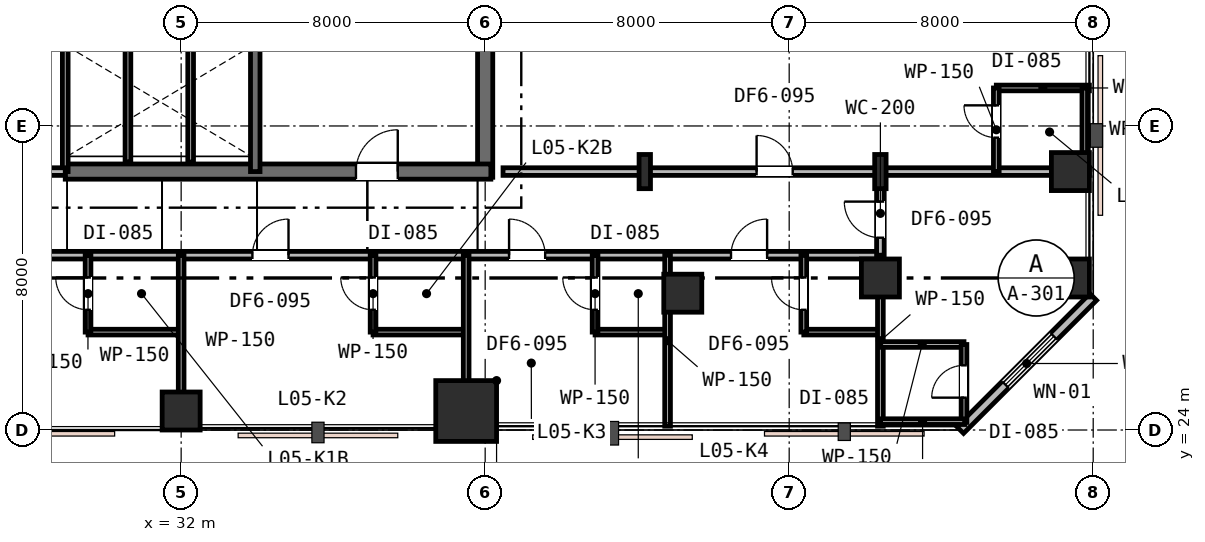
"""IFC4 building model, lengths in metres.
Left out: names, types, materials, properties, quantities, classifications, styles, units other than length and angle.
Written with IfcOpenShell. Run it as: python <this file> out.ifc"""

import sys

from ifc_helpers import new_model, si_unit, direction, frame, frame_2d, origin, origin_2d, place, context, subcontext, project, spatial, rectangle, i_section, extrude, element, fill, save


model = new_model("IFC4")
c1 = context("Model", 3, precision=1e-05, world=origin(), true_north=direction((0.0, 1.0)))
c2 = subcontext(c1, "Body", "Model", "MODEL_VIEW")
j1 = project(units=[si_unit("LENGTHUNIT", "METRE"), si_unit("PLANEANGLEUNIT", "RADIAN")], contexts=[c1])
p1 = place(None, origin())
s1 = spatial("IfcSite", under=j1, at=p1, CompositionType="ELEMENT")
p2 = place(p1, origin())
s2 = spatial("IfcBuilding", under=s1, at=p2, CompositionType="ELEMENT")
p3 = place(p2, frame((0.0, 0.0, 25.8)))
s3 = spatial("IfcBuildingStorey", under=s2, at=p3, CompositionType="ELEMENT", Elevation=25.8)
p4 = place(p3, frame((40.0, 30.65, 0.0), z_axis=(0.0, 0.0, 1.0), x_axis=(0.0, 1.0, 0.0)))
e1 = element("IfcWall", 1, at=p4, inside=s3, PredefinedType="SHEAR", context=c2, shape_type="SweptSolid", body=[
    extrude(rectangle(XDim=12.3, YDim=0.4, at=frame_2d((6.15, 0.0))), origin(), (0.0, 0.0, 1.0), 3.6),
])
p5 = place(p3, frame((28.95, 30.8, 0.0), z_axis=(0.0, 0.0, 1.0), x_axis=(1.0, 0.0, 0.0)))
e2 = element("IfcWall", 2, at=p5, inside=s3, PredefinedType="SHEAR", context=c2, shape_type="SweptSolid", body=[
    extrude(rectangle(XDim=11.2, YDim=0.4, at=frame_2d((5.6, 0.0))), origin(), (0.0, 0.0, 1.0), 3.6),
])
p6 = place(p5, frame((7.65, 0.0, 0.0)))
e3 = element("IfcOpeningElement", 3, at=p6, cuts=e2, PredefinedType="OPENING", context=c2, shape_type="SweptSolid", body=[
    extrude(rectangle(XDim=1.1, YDim=2.15, at=frame_2d((0.55, 1.075))), frame((0.0, 0.21, 0.0), z_axis=(0.0, -1.0, 0.0), x_axis=(1.0, 0.0, 0.0)), (0.0, 0.0, 1.0), 0.42),
])
p7 = place(p3, frame((33.95, 30.8, 0.0), z_axis=(0.0, 0.0, 1.0), x_axis=(0.0, 1.0, 0.0)))
e4 = element("IfcWall", 4, at=p7, inside=s3, PredefinedType="SHEAR", context=c2, shape_type="SweptSolid", body=[
    extrude(rectangle(XDim=6.45, YDim=0.25, at=frame_2d((3.225, 0.0))), origin(), (0.0, 0.0, 1.0), 3.6),
])
p8 = place(p3, frame((32.0, 24.5, 0.0), z_axis=(0.0, 0.0, 1.0), x_axis=(1.0, 0.0, 0.0)))
e5 = element("IfcColumn", 5, at=p8, inside=s3, PredefinedType="COLUMN", context=c2, shape_type="SweptSolid", body=[
    extrude(rectangle(XDim=1.0, YDim=1.0, at=origin_2d()), origin(), (0.0, 0.0, 1.0), 3.6),
])
p9 = place(p3, frame((39.5, 24.5, 0.0), z_axis=(0.0, 0.0, 1.0), x_axis=(1.0, 0.0, 0.0)))
e6 = element("IfcColumn", 6, at=p9, inside=s3, PredefinedType="COLUMN", context=c2, shape_type="SweptSolid", body=[
    extrude(rectangle(XDim=1.6, YDim=1.6, at=origin_2d()), origin(), (0.0, 0.0, 1.0), 3.6),
])
for number, where, z_axis, x_axis in (
    (7, (45.2, 27.6, 0.0), (0.0, 0.0, 1.0), (1.0, 0.0, 0.0)),
    (8, (50.4, 28.0, 0.0), (0.0, 0.0, 1.0), (1.0, 0.0, 0.0)),
    (9, (55.4, 28.0, 0.0), (0.0, 0.0, 1.0), (1.0, 0.0, 0.0)),
    (10, (55.4, 30.8, 0.0), (0.0, 0.0, 1.0), (1.0, 0.0, 0.0)),
):
    element("IfcColumn", number, at=place(p3, frame(where, z_axis=z_axis, x_axis=x_axis)), inside=s3, PredefinedType="COLUMN", context=c2, shape_type="SweptSolid", body=[
        extrude(rectangle(XDim=1.0, YDim=1.0, at=origin_2d()), origin(), (0.0, 0.0, 1.0), 3.6),
    ])
for number, where, z_axis, x_axis in (
    (11, (44.2, 30.8, 0.0), (0.0, 0.0, 1.0), (1.0, 0.0, 0.0)),
    (12, (50.4, 30.8, 0.0), (0.0, 0.0, 1.0), (1.0, 0.0, 0.0)),
):
    element("IfcColumn", number, at=place(p3, frame(where, z_axis=z_axis, x_axis=x_axis)), inside=s3, PredefinedType="COLUMN", context=c2, shape_type="SweptSolid", body=[
        extrude(i_section(OverallWidth=0.3, OverallDepth=0.9, WebThickness=0.018, FlangeThickness=0.035, FilletRadius=0.03, at=origin_2d()), origin(), (0.0, 0.0, 1.0), 3.6),
    ])
p10 = place(p3, frame((52.5, 24.0, 0.0), z_axis=(0.0, 0.0, 1.0), x_axis=(0.707106781187, 0.707106781187, 0.0)))
e13 = element("IfcWall", 13, at=p10, inside=s3, PredefinedType="STANDARD", context=c2, shape_type="SweptSolid", body=[
    extrude(rectangle(XDim=4.95, YDim=0.25, at=frame_2d((2.475, 0.0))), origin(), (0.0, 0.0, 1.0), 3.33),
])
p11 = place(p10, frame((1.685, 0.0, 0.75)))
e14 = element("IfcOpeningElement", 14, at=p11, cuts=e13, PredefinedType="OPENING", context=c2, shape_type="SweptSolid", body=[
    extrude(rectangle(XDim=1.8, YDim=1.85, at=frame_2d((0.9, 0.925))), frame((0.0, 0.135, 0.0), z_axis=(0.0, -1.0, 0.0), x_axis=(1.0, 0.0, 0.0)), (0.0, 0.0, 1.0), 0.27),
])
p12 = place(p3, frame((28.95, 30.8, 0.0), z_axis=(0.0, 0.0, 1.0), x_axis=(0.0, 1.0, 0.0)))
e15 = element("IfcWall", 15, at=p12, inside=s3, PredefinedType="PLUMBINGWALL", context=c2, shape_type="SweptSolid", body=[
    extrude(rectangle(XDim=3.45, YDim=0.15, at=frame_2d((1.725, 0.0))), origin(), (0.0, 0.0, 1.0), 3.33),
])
p13 = place(p3, frame((27.05, 30.8, 0.0), z_axis=(0.0, 0.0, 1.0), x_axis=(1.0, 0.0, 0.0)))
e16 = element("IfcWall", 16, at=p13, inside=s3, PredefinedType="PARTITIONING", context=c2, shape_type="SweptSolid", body=[
    extrude(rectangle(XDim=1.9, YDim=0.2, at=frame_2d((0.95, 0.0))), origin(), (0.0, 0.0, 1.0), 3.33),
])
p14 = place(p13, frame((0.4, 0.0, 0.0)))
e17 = element("IfcOpeningElement", 17, at=p14, cuts=e16, PredefinedType="OPENING", context=c2, shape_type="SweptSolid", body=[
    extrude(rectangle(XDim=1.1, YDim=2.15, at=frame_2d((0.55, 1.075))), frame((0.0, 0.11, 0.0), z_axis=(0.0, -1.0, 0.0), x_axis=(1.0, 0.0, 0.0)), (0.0, 0.0, 1.0), 0.22),
])
for number, where, z_axis, x_axis in (
    (18, (30.6, 31.05, 0.0), (0.0, 0.0, 1.0), (0.0, 1.0, 0.0)),
    (19, (32.25, 31.05, 0.0), (0.0, 0.0, 1.0), (0.0, 1.0, 0.0)),
):
    element("IfcWall", number, at=place(p3, frame(where, z_axis=z_axis, x_axis=x_axis)), inside=s3, PredefinedType="PLUMBINGWALL", context=c2, shape_type="SweptSolid", body=[
        extrude(rectangle(XDim=3.1, YDim=0.15, at=frame_2d((1.55, 0.0))), origin(), (0.0, 0.0, 1.0), 3.33),
    ])
p15 = place(p3, frame((13.8, 28.6, 0.0), z_axis=(0.0, 0.0, 1.0), x_axis=(1.0, 0.0, 0.0)))
e20 = element("IfcWall", 20, at=p15, inside=s3, PredefinedType="PARTITIONING", context=c2, shape_type="SweptSolid", body=[
    extrude(rectangle(XDim=36.6, YDim=0.2, at=frame_2d((18.3, 0.0))), origin(), (0.0, 0.0, 1.0), 2.68),
])
p16 = place(p15, frame((12.3, 0.0, 0.0)))
e21 = element("IfcOpeningElement", 21, at=p16, cuts=e20, PredefinedType="OPENING", context=c2, shape_type="SweptSolid", body=[
    extrude(rectangle(XDim=0.95, YDim=2.15, at=frame_2d((0.475, 1.075))), frame((0.0, 0.11, 0.0), z_axis=(0.0, -1.0, 0.0), x_axis=(1.0, 0.0, 0.0)), (0.0, 0.0, 1.0), 0.22),
])
p17 = place(p15, frame((20.075, 0.0, 0.0)))
e22 = element("IfcOpeningElement", 22, at=p17, cuts=e20, PredefinedType="OPENING", context=c2, shape_type="SweptSolid", body=[
    extrude(rectangle(XDim=0.95, YDim=2.15, at=frame_2d((0.475, 1.075))), frame((0.0, 0.11, 0.0), z_axis=(0.0, -1.0, 0.0), x_axis=(1.0, 0.0, 0.0)), (0.0, 0.0, 1.0), 0.22),
])
p18 = place(p15, frame((26.829, 0.0, 0.0)))
e23 = element("IfcOpeningElement", 23, at=p18, cuts=e20, PredefinedType="OPENING", context=c2, shape_type="SweptSolid", body=[
    extrude(rectangle(XDim=0.95, YDim=2.15, at=frame_2d((0.475, 1.075))), frame((0.0, 0.11, 0.0), z_axis=(0.0, -1.0, 0.0), x_axis=(1.0, 0.0, 0.0)), (0.0, 0.0, 1.0), 0.22),
])
p19 = place(p15, frame((32.669, 0.0, 0.0)))
e24 = element("IfcOpeningElement", 24, at=p19, cuts=e20, PredefinedType="OPENING", context=c2, shape_type="SweptSolid", body=[
    extrude(rectangle(XDim=0.95, YDim=2.15, at=frame_2d((0.475, 1.075))), frame((0.0, 0.11, 0.0), z_axis=(0.0, -1.0, 0.0), x_axis=(1.0, 0.0, 0.0)), (0.0, 0.0, 1.0), 0.22),
])
p20 = place(p3, frame((29.55, 26.576, 0.0), z_axis=(0.0, 0.0, 1.0), x_axis=(1.0, 0.0, 0.0)))
e25 = element("IfcWall", 25, at=p20, inside=s3, PredefinedType="PARTITIONING", context=c2, shape_type="SweptSolid", body=[
    extrude(rectangle(XDim=2.45, YDim=0.15, at=frame_2d((1.225, 0.0))), origin(), (0.0, 0.0, 1.0), 3.33),
])
p21 = place(p3, frame((29.55, 26.576, 0.0), z_axis=(0.0, 0.0, 1.0), x_axis=(0.0, 1.0, 0.0)))
e26 = element("IfcWall", 26, at=p21, inside=s3, PredefinedType="PARTITIONING", context=c2, shape_type="SweptSolid", body=[
    extrude(rectangle(XDim=2.024, YDim=0.15, at=frame_2d((1.012, 0.0))), origin(), (0.0, 0.0, 1.0), 3.33),
])
p22 = place(p21, frame((0.587, 0.0, 0.0)))
e27 = element("IfcOpeningElement", 27, at=p22, cuts=e26, PredefinedType="OPENING", context=c2, shape_type="SweptSolid", body=[
    extrude(rectangle(XDim=0.85, YDim=2.15, at=frame_2d((0.425, 1.075))), frame((0.0, 0.085, 0.0), z_axis=(0.0, -1.0, 0.0), x_axis=(1.0, 0.0, 0.0)), (0.0, 0.0, 1.0), 0.17),
])
p23 = place(p3, frame((32.0, 28.6, 0.0), z_axis=(0.0, 0.0, 1.0), x_axis=(0.0, -1.0, 0.0)))
e28 = element("IfcWall", 28, at=p23, inside=s3, PredefinedType="PARTITIONING", context=c2, shape_type="SweptSolid", body=[
    extrude(rectangle(XDim=4.5, YDim=0.15, at=frame_2d((2.25, 0.0))), origin(), (0.0, 0.0, 1.0), 2.87),
])
p24 = place(p3, frame((37.05, 26.576, 0.0), z_axis=(0.0, 0.0, 1.0), x_axis=(1.0, 0.0, 0.0)))
e29 = element("IfcWall", 29, at=p24, inside=s3, PredefinedType="PARTITIONING", context=c2, shape_type="SweptSolid", body=[
    extrude(rectangle(XDim=2.45, YDim=0.15, at=frame_2d((1.225, 0.0))), origin(), (0.0, 0.0, 1.0), 2.68),
])
p25 = place(p3, frame((37.05, 26.576, 0.0), z_axis=(0.0, 0.0, 1.0), x_axis=(0.0, 1.0, 0.0)))
e30 = element("IfcWall", 30, at=p25, inside=s3, PredefinedType="PARTITIONING", context=c2, shape_type="SweptSolid", body=[
    extrude(rectangle(XDim=2.024, YDim=0.15, at=frame_2d((1.012, 0.0))), origin(), (0.0, 0.0, 1.0), 2.92),
])
p26 = place(p25, frame((0.587, 0.0, 0.0)))
e31 = element("IfcOpeningElement", 31, at=p26, cuts=e30, PredefinedType="OPENING", context=c2, shape_type="SweptSolid", body=[
    extrude(rectangle(XDim=0.85, YDim=2.15, at=frame_2d((0.425, 1.075))), frame((0.0, 0.085, 0.0), z_axis=(0.0, -1.0, 0.0), x_axis=(1.0, 0.0, 0.0)), (0.0, 0.0, 1.0), 0.17),
])
p27 = place(p3, frame((39.5, 28.6, 0.0), z_axis=(0.0, 0.0, 1.0), x_axis=(0.0, -1.0, 0.0)))
e32 = element("IfcWall", 32, at=p27, inside=s3, PredefinedType="PARTITIONING", context=c2, shape_type="SweptSolid", body=[
    extrude(rectangle(XDim=4.5, YDim=0.15, at=frame_2d((2.25, 0.0))), origin(), (0.0, 0.0, 1.0), 2.68),
])
p28 = place(p3, frame((42.892, 26.576, 0.0), z_axis=(0.0, 0.0, 1.0), x_axis=(1.0, 0.0, 0.0)))
e33 = element("IfcWall", 33, at=p28, inside=s3, PredefinedType="PARTITIONING", context=c2, shape_type="SweptSolid", body=[
    extrude(rectangle(XDim=1.908, YDim=0.15, at=frame_2d((0.954, 0.0))), origin(), (0.0, 0.0, 1.0), 3.33),
])
p29 = place(p3, frame((42.892, 26.576, 0.0), z_axis=(0.0, 0.0, 1.0), x_axis=(0.0, 1.0, 0.0)))
e34 = element("IfcWall", 34, at=p29, inside=s3, PredefinedType="PARTITIONING", context=c2, shape_type="SweptSolid", body=[
    extrude(rectangle(XDim=2.024, YDim=0.15, at=frame_2d((1.012, 0.0))), origin(), (0.0, 0.0, 1.0), 3.33),
])
p30 = place(p29, frame((0.587, 0.0, 0.0)))
e35 = element("IfcOpeningElement", 35, at=p30, cuts=e34, PredefinedType="OPENING", context=c2, shape_type="SweptSolid", body=[
    extrude(rectangle(XDim=0.85, YDim=2.15, at=frame_2d((0.425, 1.075))), frame((0.0, 0.085, 0.0), z_axis=(0.0, -1.0, 0.0), x_axis=(1.0, 0.0, 0.0)), (0.0, 0.0, 1.0), 0.17),
])
p31 = place(p3, frame((44.8, 28.6, 0.0), z_axis=(0.0, 0.0, 1.0), x_axis=(0.0, -1.0, 0.0)))
e36 = element("IfcWall", 36, at=p31, inside=s3, PredefinedType="PARTITIONING", context=c2, shape_type="SweptSolid", body=[
    extrude(rectangle(XDim=4.5, YDim=0.15, at=frame_2d((2.25, 0.0))), origin(), (0.0, 0.0, 1.0), 2.68),
])
p32 = place(p3, frame((48.384, 26.576, 0.0), z_axis=(0.0, 0.0, 1.0), x_axis=(1.0, 0.0, 0.0)))
e37 = element("IfcWall", 37, at=p32, inside=s3, PredefinedType="PARTITIONING", context=c2, shape_type="SweptSolid", body=[
    extrude(rectangle(XDim=2.016, YDim=0.15, at=frame_2d((1.008, 0.0))), origin(), (0.0, 0.0, 1.0), 3.33),
])
p33 = place(p3, frame((48.384, 26.576, 0.0), z_axis=(0.0, 0.0, 1.0), x_axis=(0.0, 1.0, 0.0)))
e38 = element("IfcWall", 38, at=p33, inside=s3, PredefinedType="PARTITIONING", context=c2, shape_type="SweptSolid", body=[
    extrude(rectangle(XDim=2.024, YDim=0.15, at=frame_2d((1.012, 0.0))), origin(), (0.0, 0.0, 1.0), 3.33),
])
p34 = place(p33, frame((0.587, 0.0, 0.0)))
e39 = element("IfcOpeningElement", 39, at=p34, cuts=e38, PredefinedType="OPENING", context=c2, shape_type="SweptSolid", body=[
    extrude(rectangle(XDim=0.85, YDim=2.15, at=frame_2d((0.425, 1.075))), frame((0.0, 0.085, 0.0), z_axis=(0.0, -1.0, 0.0), x_axis=(1.0, 0.0, 0.0)), (0.0, 0.0, 1.0), 0.17),
])
p35 = place(p3, frame((50.4, 28.6, 0.0), z_axis=(0.0, 0.0, 1.0), x_axis=(0.0, -1.0, 0.0)))
e40 = element("IfcWall", 40, at=p35, inside=s3, PredefinedType="PARTITIONING", context=c2, shape_type="SweptSolid", body=[
    extrude(rectangle(XDim=4.5, YDim=0.15, at=frame_2d((2.25, 0.0))), origin(), (0.0, 0.0, 1.0), 2.68),
])
p36 = place(p3, frame((40.47, 30.8, 0.0), z_axis=(0.0, 0.0, 1.0), x_axis=(1.0, 0.0, 0.0)))
e41 = element("IfcWall", 41, at=p36, inside=s3, PredefinedType="PARTITIONING", context=c2, shape_type="SweptSolid", body=[
    extrude(rectangle(XDim=15.43, YDim=0.2, at=frame_2d((7.715, 0.0))), origin(), (0.0, 0.0, 1.0), 2.68),
])
p37 = place(p36, frame((6.673, 0.0, 0.0)))
e42 = element("IfcOpeningElement", 42, at=p37, cuts=e41, PredefinedType="OPENING", context=c2, shape_type="SweptSolid", body=[
    extrude(rectangle(XDim=0.95, YDim=2.15, at=frame_2d((0.475, 1.075))), frame((0.0, 0.11, 0.0), z_axis=(0.0, -1.0, 0.0), x_axis=(1.0, 0.0, 0.0)), (0.0, 0.0, 1.0), 0.22),
])
p38 = place(p3, frame((53.45, 33.0, 0.0), z_axis=(0.0, 0.0, 1.0), x_axis=(1.0, 0.0, 0.0)))
e43 = element("IfcWall", 43, at=p38, inside=s3, PredefinedType="PARTITIONING", context=c2, shape_type="SweptSolid", body=[
    extrude(rectangle(XDim=2.45, YDim=0.15, at=frame_2d((1.225, 0.0))), origin(), (0.0, 0.0, 1.0), 2.87),
])
p39 = place(p3, frame((53.45, 30.8, 0.0), z_axis=(0.0, 0.0, 1.0), x_axis=(0.0, 1.0, 0.0)))
e44 = element("IfcWall", 44, at=p39, inside=s3, PredefinedType="PARTITIONING", context=c2, shape_type="SweptSolid", body=[
    extrude(rectangle(XDim=2.2, YDim=0.15, at=frame_2d((1.1, 0.0))), origin(), (0.0, 0.0, 1.0), 2.68),
])
p40 = place(p39, frame((0.892, 0.0, 0.0)))
e45 = element("IfcOpeningElement", 45, at=p40, cuts=e44, PredefinedType="OPENING", context=c2, shape_type="SweptSolid", body=[
    extrude(rectangle(XDim=0.85, YDim=2.15, at=frame_2d((0.425, 1.075))), frame((0.0, 0.085, 0.0), z_axis=(0.0, -1.0, 0.0), x_axis=(1.0, 0.0, 0.0)), (0.0, 0.0, 1.0), 0.17),
])
p41 = place(p3, frame((55.78, 33.0, 0.0), z_axis=(0.0, 0.0, 1.0), x_axis=(0.0, -1.0, 0.0)))
e46 = element("IfcWall", 46, at=p41, inside=s3, PredefinedType="PARTITIONING", context=c2, shape_type="SweptSolid", body=[
    extrude(rectangle(XDim=2.2, YDim=0.15, at=frame_2d((1.1, 0.0))), origin(), (0.0, 0.0, 1.0), 2.68),
])
p42 = place(p3, frame((50.4, 28.6, 0.0), z_axis=(0.0, 0.0, 1.0), x_axis=(0.0, 1.0, 0.0)))
e47 = element("IfcWall", 47, at=p42, inside=s3, PredefinedType="PARTITIONING", context=c2, shape_type="SweptSolid", body=[
    extrude(rectangle(XDim=2.2, YDim=0.2, at=frame_2d((1.1, 0.0))), origin(), (0.0, 0.0, 1.0), 2.68),
])
p43 = place(p42, frame((0.46, 0.0, 0.0)))
e48 = element("IfcOpeningElement", 48, at=p43, cuts=e47, PredefinedType="OPENING", context=c2, shape_type="SweptSolid", body=[
    extrude(rectangle(XDim=0.95, YDim=2.15, at=frame_2d((0.475, 1.075))), frame((0.0, 0.11, 0.0), z_axis=(0.0, -1.0, 0.0), x_axis=(1.0, 0.0, 0.0)), (0.0, 0.0, 1.0), 0.22),
])
p44 = place(p3, frame((50.4, 26.25, 0.0), z_axis=(0.0, 0.0, 1.0), x_axis=(1.0, 0.0, 0.0)))
e49 = element("IfcWall", 49, at=p44, inside=s3, PredefinedType="PARTITIONING", context=c2, shape_type="SweptSolid", body=[
    extrude(rectangle(XDim=2.2, YDim=0.15, at=frame_2d((1.1, 0.0))), origin(), (0.0, 0.0, 1.0), 3.33),
])
p45 = place(p3, frame((52.6, 24.2, 0.0), z_axis=(0.0, 0.0, 1.0), x_axis=(0.0, 1.0, 0.0)))
e50 = element("IfcWall", 50, at=p45, inside=s3, PredefinedType="PARTITIONING", context=c2, shape_type="SweptSolid", body=[
    extrude(rectangle(XDim=2.05, YDim=0.15, at=frame_2d((1.025, 0.0))), origin(), (0.0, 0.0, 1.0), 3.33),
])
p46 = place(p45, frame((0.651, 0.0, 0.0)))
e51 = element("IfcOpeningElement", 51, at=p46, cuts=e50, PredefinedType="OPENING", context=c2, shape_type="SweptSolid", body=[
    extrude(rectangle(XDim=0.85, YDim=2.15, at=frame_2d((0.425, 1.075))), frame((0.0, 0.085, 0.0), z_axis=(0.0, -1.0, 0.0), x_axis=(1.0, 0.0, 0.0)), (0.0, 0.0, 1.0), 0.17),
])
p47 = place(p3, frame((52.62, 24.22, 0.0), z_axis=(0.0, 0.0, 1.0), x_axis=(-1.0, 0.0, 0.0)))
e52 = element("IfcWall", 52, at=p47, inside=s3, PredefinedType="PARTITIONING", context=c2, shape_type="SweptSolid", body=[
    extrude(rectangle(XDim=2.22, YDim=0.15, at=frame_2d((1.11, 0.0))), origin(), (0.0, 0.0, 1.0), 3.33),
])
p48 = place(p11, origin())
e53 = element("IfcWindow", 53, at=p48, inside=s3, PartitioningType="SINGLE_PANEL", PredefinedType="WINDOW", context=c2, shape_type="SweptSolid", body=[
    extrude(rectangle(XDim=1.8, YDim=1.85, at=frame_2d((0.9, 0.925))), frame((0.0, 0.03, 0.0), z_axis=(0.0, -1.0, 0.0), x_axis=(1.0, 0.0, 0.0)), (0.0, 0.0, 1.0), 0.06),
])
fill(e14, e53)
p49 = place(p6, origin())
e54 = element("IfcDoor", 54, at=p49, inside=s3, OperationType="SINGLE_SWING_RIGHT", PredefinedType="DOOR", context=c2, shape_type="SweptSolid", body=[
    extrude(rectangle(XDim=1.1, YDim=2.15, at=frame_2d((0.55, 1.075))), frame((0.0, 0.025, 0.0), z_axis=(0.0, -1.0, 0.0), x_axis=(1.0, 0.0, 0.0)), (0.0, 0.0, 1.0), 0.05),
])
fill(e3, e54)
p50 = place(p22, origin())
e55 = element("IfcDoor", 55, at=p50, inside=s3, OperationType="SINGLE_SWING_RIGHT", PredefinedType="DOOR", context=c2, shape_type="SweptSolid", body=[
    extrude(rectangle(XDim=0.85, YDim=2.15, at=frame_2d((0.425, 1.075))), frame((0.0, 0.025, 0.0), z_axis=(0.0, -1.0, 0.0), x_axis=(1.0, 0.0, 0.0)), (0.0, 0.0, 1.0), 0.05),
])
fill(e27, e55)
p51 = place(p17, origin())
e56 = element("IfcDoor", 56, at=p51, inside=s3, OperationType="SINGLE_SWING_RIGHT", PredefinedType="DOOR", context=c2, shape_type="SweptSolid", body=[
    extrude(rectangle(XDim=0.95, YDim=2.15, at=frame_2d((0.475, 1.075))), frame((0.0, 0.025, 0.0), z_axis=(0.0, -1.0, 0.0), x_axis=(1.0, 0.0, 0.0)), (0.0, 0.0, 1.0), 0.05),
])
fill(e22, e56)
p52 = place(p26, origin())
e57 = element("IfcDoor", 57, at=p52, inside=s3, OperationType="SINGLE_SWING_RIGHT", PredefinedType="DOOR", context=c2, shape_type="SweptSolid", body=[
    extrude(rectangle(XDim=0.85, YDim=2.15, at=frame_2d((0.425, 1.075))), frame((0.0, 0.025, 0.0), z_axis=(0.0, -1.0, 0.0), x_axis=(1.0, 0.0, 0.0)), (0.0, 0.0, 1.0), 0.05),
])
fill(e31, e57)
p53 = place(p18, origin())
e58 = element("IfcDoor", 58, at=p53, inside=s3, OperationType="SINGLE_SWING_LEFT", PredefinedType="DOOR", context=c2, shape_type="SweptSolid", body=[
    extrude(rectangle(XDim=0.95, YDim=2.15, at=frame_2d((0.475, 1.075))), frame((0.0, 0.025, 0.0), z_axis=(0.0, -1.0, 0.0), x_axis=(1.0, 0.0, 0.0)), (0.0, 0.0, 1.0), 0.05),
])
fill(e23, e58)
p54 = place(p30, origin())
e59 = element("IfcDoor", 59, at=p54, inside=s3, OperationType="SINGLE_SWING_RIGHT", PredefinedType="DOOR", context=c2, shape_type="SweptSolid", body=[
    extrude(rectangle(XDim=0.85, YDim=2.15, at=frame_2d((0.425, 1.075))), frame((0.0, 0.025, 0.0), z_axis=(0.0, -1.0, 0.0), x_axis=(1.0, 0.0, 0.0)), (0.0, 0.0, 1.0), 0.05),
])
fill(e35, e59)
p55 = place(p19, origin())
e60 = element("IfcDoor", 60, at=p55, inside=s3, OperationType="SINGLE_SWING_RIGHT", PredefinedType="DOOR", context=c2, shape_type="SweptSolid", body=[
    extrude(rectangle(XDim=0.95, YDim=2.15, at=frame_2d((0.475, 1.075))), frame((0.0, 0.025, 0.0), z_axis=(0.0, -1.0, 0.0), x_axis=(1.0, 0.0, 0.0)), (0.0, 0.0, 1.0), 0.05),
])
fill(e24, e60)
p56 = place(p34, origin())
e61 = element("IfcDoor", 61, at=p56, inside=s3, OperationType="SINGLE_SWING_RIGHT", PredefinedType="DOOR", context=c2, shape_type="SweptSolid", body=[
    extrude(rectangle(XDim=0.85, YDim=2.15, at=frame_2d((0.425, 1.075))), frame((0.0, 0.025, 0.0), z_axis=(0.0, -1.0, 0.0), x_axis=(1.0, 0.0, 0.0)), (0.0, 0.0, 1.0), 0.05),
])
fill(e39, e61)
p57 = place(p37, origin())
e62 = element("IfcDoor", 62, at=p57, inside=s3, OperationType="SINGLE_SWING_LEFT", PredefinedType="DOOR", context=c2, shape_type="SweptSolid", body=[
    extrude(rectangle(XDim=0.95, YDim=2.15, at=frame_2d((0.475, 1.075))), frame((0.0, 0.025, 0.0), z_axis=(0.0, -1.0, 0.0), x_axis=(1.0, 0.0, 0.0)), (0.0, 0.0, 1.0), 0.05),
])
fill(e42, e62)
p58 = place(p40, origin())
e63 = element("IfcDoor", 63, at=p58, inside=s3, OperationType="SINGLE_SWING_RIGHT", PredefinedType="DOOR", context=c2, shape_type="SweptSolid", body=[
    extrude(rectangle(XDim=0.85, YDim=2.15, at=frame_2d((0.425, 1.075))), frame((0.0, 0.025, 0.0), z_axis=(0.0, -1.0, 0.0), x_axis=(1.0, 0.0, 0.0)), (0.0, 0.0, 1.0), 0.05),
])
fill(e45, e63)
p59 = place(p43, origin())
e64 = element("IfcDoor", 64, at=p59, inside=s3, OperationType="SINGLE_SWING_RIGHT", PredefinedType="DOOR", context=c2, shape_type="SweptSolid", body=[
    extrude(rectangle(XDim=0.95, YDim=2.15, at=frame_2d((0.475, 1.075))), frame((0.0, 0.025, 0.0), z_axis=(0.0, -1.0, 0.0), x_axis=(1.0, 0.0, 0.0)), (0.0, 0.0, 1.0), 0.05),
])
fill(e48, e64)
p60 = place(p46, origin())
e65 = element("IfcDoor", 65, at=p60, inside=s3, OperationType="SINGLE_SWING_LEFT", PredefinedType="DOOR", context=c2, shape_type="SweptSolid", body=[
    extrude(rectangle(XDim=0.85, YDim=2.15, at=frame_2d((0.425, 1.075))), frame((0.0, 0.025, 0.0), z_axis=(0.0, -1.0, 0.0), x_axis=(1.0, 0.0, 0.0)), (0.0, 0.0, 1.0), 0.05),
])
fill(e51, e65)
save(model, sys.argv[1])
